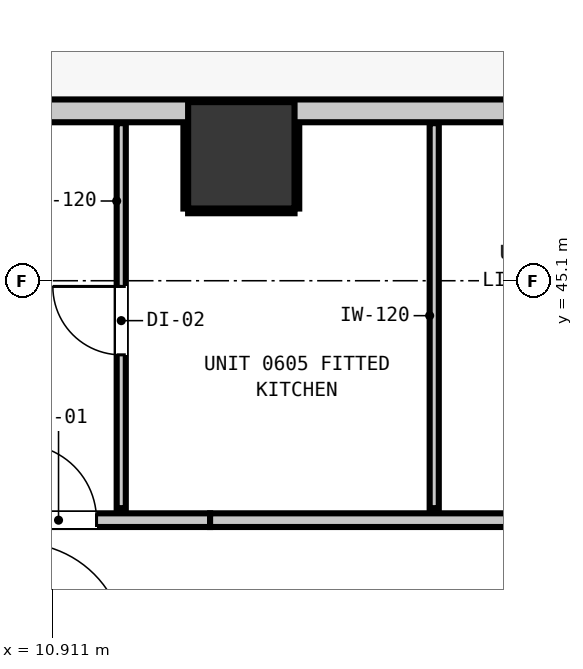
"""IFC4 building model, lengths in metres.
Left out: names, types, materials, properties, quantities, classifications, styles, units other than length and angle.
Written with IfcOpenShell. Run it as: python <this file> out.ifc"""

import sys

from ifc_helpers import new_model, si_unit, direction, frame, frame_2d, origin, origin_2d, place, context, subcontext, project, spatial, rectangle, extrude, element, fill, save


model = new_model("IFC4")
c1 = context("Model", 3, precision=1e-05, world=origin(), true_north=direction((0.0, 1.0)))
c2 = subcontext(c1, "Body", "Model", "MODEL_VIEW")
j1 = project(units=[si_unit("LENGTHUNIT", "METRE"), si_unit("PLANEANGLEUNIT", "RADIAN")], contexts=[c1])
p1 = place(None, origin())
s1 = spatial("IfcSite", under=j1, at=p1, CompositionType="ELEMENT")
p2 = place(p1, origin())
s2 = spatial("IfcBuilding", under=s1, at=p2, CompositionType="ELEMENT")
p3 = place(p2, frame((0.0, 0.0, 25.32)))
s3 = spatial("IfcBuildingStorey", under=s2, at=p3, CompositionType="ELEMENT", Elevation=25.32)
p4 = place(p3, frame((13.4, 46.75, 0.0), z_axis=(0.0, 0.0, 1.0), x_axis=(1.0, 0.0, 0.0)))
e1 = element("IfcColumn", 1, at=p4, inside=s3, PredefinedType="COLUMN", context=c2, shape_type="SweptSolid", body=[
    extrude(rectangle(XDim=1.4, YDim=1.4, at=origin_2d()), origin(), (0.0, 0.0, 1.0), 3.32),
])
p5 = place(p3, frame((4.165, 47.335, 0.0), z_axis=(0.0, 0.0, 1.0), x_axis=(1.0, 0.0, 0.0)))
e2 = element("IfcWall", 2, at=p5, inside=s3, PredefinedType="STANDARD", context=c2, shape_type="SweptSolid", body=[
    extrude(rectangle(XDim=37.47, YDim=0.3, at=frame_2d((18.735, 0.0))), origin(), (0.0, 0.0, 1.0), 3.06),
])
p6 = place(p5, frame((0.901, 0.0, 0.0)))
e3 = element("IfcOpeningElement", 3, at=p6, cuts=e2, PredefinedType="OPENING", context=c2, shape_type="SweptSolid", body=[
    extrude(rectangle(XDim=1.0, YDim=2.15, at=frame_2d((0.5, 1.075))), frame((0.0, 0.16, 0.0), z_axis=(0.0, -1.0, 0.0), x_axis=(1.0, 0.0, 0.0)), (0.0, 0.0, 1.0), 0.32),
])
p7 = place(p5, frame((4.243, 0.0, 0.85)))
e4 = element("IfcOpeningElement", 4, at=p7, cuts=e2, PredefinedType="OPENING", context=c2, shape_type="SweptSolid", body=[
    extrude(rectangle(XDim=1.65, YDim=1.75, at=frame_2d((0.825, 0.875))), frame((0.0, 0.16, 0.0), z_axis=(0.0, -1.0, 0.0), x_axis=(1.0, 0.0, 0.0)), (0.0, 0.0, 1.0), 0.32),
])
p8 = place(p5, frame((13.079, 0.0, 0.85)))
e5 = element("IfcOpeningElement", 5, at=p8, cuts=e2, PredefinedType="OPENING", context=c2, shape_type="SweptSolid", body=[
    extrude(rectangle(XDim=1.65, YDim=1.75, at=frame_2d((0.825, 0.875))), frame((0.0, 0.16, 0.0), z_axis=(0.0, -1.0, 0.0), x_axis=(1.0, 0.0, 0.0)), (0.0, 0.0, 1.0), 0.32),
])
p9 = place(p5, frame((29.274, 0.0, 0.85)))
e6 = element("IfcOpeningElement", 6, at=p9, cuts=e2, PredefinedType="OPENING", context=c2, shape_type="SweptSolid", body=[
    extrude(rectangle(XDim=1.65, YDim=1.75, at=frame_2d((0.825, 0.875))), frame((0.0, 0.16, 0.0), z_axis=(0.0, -1.0, 0.0), x_axis=(1.0, 0.0, 0.0)), (0.0, 0.0, 1.0), 0.32),
])
p10 = place(p5, frame((26.224, 0.0, 0.85)))
e7 = element("IfcOpeningElement", 7, at=p10, cuts=e2, PredefinedType="OPENING", context=c2, shape_type="SweptSolid", body=[
    extrude(rectangle(XDim=1.65, YDim=1.75, at=frame_2d((0.825, 0.875))), frame((0.0, 0.16, 0.0), z_axis=(0.0, -1.0, 0.0), x_axis=(1.0, 0.0, 0.0)), (0.0, 0.0, 1.0), 0.32),
])
p11 = place(p3, frame((2.661, 41.95, 0.0), z_axis=(0.0, 0.0, 1.0), x_axis=(1.0, 0.0, 0.0)))
e8 = element("IfcWall", 8, at=p11, inside=s3, PredefinedType="PARTITIONING", context=c2, shape_type="SweptSolid", body=[
    extrude(rectangle(XDim=10.328, YDim=0.18, at=frame_2d((5.164, 0.0))), origin(), (0.0, 0.0, 1.0), 2.445),
])
p12 = place(p11, frame((7.834, 0.0, 0.0)))
e9 = element("IfcOpeningElement", 9, at=p12, cuts=e8, PredefinedType="OPENING", context=c2, shape_type="SweptSolid", body=[
    extrude(rectangle(XDim=1.0, YDim=2.15, at=frame_2d((0.5, 1.075))), frame((0.0, 0.1, 0.0), z_axis=(0.0, -1.0, 0.0), x_axis=(1.0, 0.0, 0.0)), (0.0, 0.0, 1.0), 0.2),
])
p13 = place(p3, frame((12.989, 41.95, 0.0), z_axis=(0.0, 0.0, 1.0), x_axis=(1.0, 0.0, 0.0)))
e10 = element("IfcWall", 10, at=p13, inside=s3, PredefinedType="PARTITIONING", context=c2, shape_type="SweptSolid", body=[
    extrude(rectangle(XDim=30.984, YDim=0.18, at=frame_2d((15.492, 0.0))), origin(), (0.0, 0.0, 1.0), 3.06),
])
p14 = place(p13, frame((6.34, 0.0, 0.0)))
e11 = element("IfcOpeningElement", 11, at=p14, cuts=e10, PredefinedType="OPENING", context=c2, shape_type="SweptSolid", body=[
    extrude(rectangle(XDim=1.0, YDim=2.15, at=frame_2d((0.5, 1.075))), frame((0.0, 0.1, 0.0), z_axis=(0.0, -1.0, 0.0), x_axis=(1.0, 0.0, 0.0)), (0.0, 0.0, 1.0), 0.2),
])
p15 = place(p13, frame((22.601, 0.0, 0.0)))
e12 = element("IfcOpeningElement", 12, at=p15, cuts=e10, PredefinedType="OPENING", context=c2, shape_type="SweptSolid", body=[
    extrude(rectangle(XDim=1.0, YDim=2.15, at=frame_2d((0.5, 1.075))), frame((0.0, 0.1, 0.0), z_axis=(0.0, -1.0, 0.0), x_axis=(1.0, 0.0, 0.0)), (0.0, 0.0, 1.0), 0.2),
])
p16 = place(p3, frame((11.82, 42.108, 0.0), z_axis=(0.0, 0.0, 1.0), x_axis=(0.0, 1.0, 0.0)))
e13 = element("IfcWall", 13, at=p16, inside=s3, PredefinedType="PARTITIONING", context=c2, shape_type="SweptSolid", body=[
    extrude(rectangle(XDim=5.065, YDim=0.12, at=frame_2d((2.533, 0.0))), origin(), (0.0, 0.0, 1.0), 3.06),
])
p17 = place(p16, frame((2.017, 0.0, 0.0)))
e14 = element("IfcOpeningElement", 14, at=p17, cuts=e13, PredefinedType="OPENING", context=c2, shape_type="SweptSolid", body=[
    extrude(rectangle(XDim=0.9, YDim=2.1, at=frame_2d((0.45, 1.05))), frame((0.0, 0.07, 0.0), z_axis=(0.0, -1.0, 0.0), x_axis=(1.0, 0.0, 0.0)), (0.0, 0.0, 1.0), 0.14),
])
p18 = place(p3, frame((15.938, 42.108, 0.0), z_axis=(0.0, 0.0, 1.0), x_axis=(0.0, 1.0, 0.0)))
e15 = element("IfcWall", 15, at=p18, inside=s3, PredefinedType="PARTITIONING", context=c2, shape_type="SweptSolid", body=[
    extrude(rectangle(XDim=5.065, YDim=0.12, at=frame_2d((2.533, 0.0))), origin(), (0.0, 0.0, 1.0), 3.06),
])
p19 = place(p3, frame((12.7, 46.018, 0.0), z_axis=(0.0, 0.0, 1.0), x_axis=(1.0, 0.0, 0.0)))
e16 = element("IfcWall", 16, at=p19, inside=s3, PredefinedType="PARTITIONING", context=c2, shape_type="SweptSolid", body=[
    extrude(rectangle(XDim=1.4, YDim=0.06, at=frame_2d((0.7, 0.0))), origin(), (0.0, 0.0, 1.0), 1.45),
])
for number, where, z_axis, x_axis in (
    (17, (12.668, 46.05, 0.0), (0.0, 0.0, 1.0), (0.0, 1.0, 0.0)),
    (18, (14.132, 46.05, 0.0), (0.0, 0.0, 1.0), (0.0, 1.0, 0.0)),
):
    element("IfcWall", number, at=place(p3, frame(where, z_axis=z_axis, x_axis=x_axis)), inside=s3, PredefinedType="PARTITIONING", context=c2, shape_type="SweptSolid", body=[
        extrude(rectangle(XDim=1.12, YDim=0.06, at=frame_2d((0.56, 0.0))), origin(), (0.0, 0.0, 1.0), 1.45),
    ])
p20 = place(p12, origin())
e19 = element("IfcDoor", 19, at=p20, inside=s3, OperationType="SINGLE_SWING_LEFT", PredefinedType="DOOR", context=c2, shape_type="SweptSolid", body=[
    extrude(rectangle(XDim=1.0, YDim=2.15, at=frame_2d((0.5, 1.075))), frame((0.0, 0.025, 0.0), z_axis=(0.0, -1.0, 0.0), x_axis=(1.0, 0.0, 0.0)), (0.0, 0.0, 1.0), 0.05),
])
fill(e9, e19)
p21 = place(p17, origin())
e20 = element("IfcDoor", 20, at=p21, inside=s3, OperationType="SINGLE_SWING_RIGHT", PredefinedType="DOOR", context=c2, shape_type="SweptSolid", body=[
    extrude(rectangle(XDim=0.9, YDim=2.1, at=frame_2d((0.45, 1.05))), frame((0.0, 0.025, 0.0), z_axis=(0.0, -1.0, 0.0), x_axis=(1.0, 0.0, 0.0)), (0.0, 0.0, 1.0), 0.05),
])
fill(e14, e20)
save(model, sys.argv[1])
